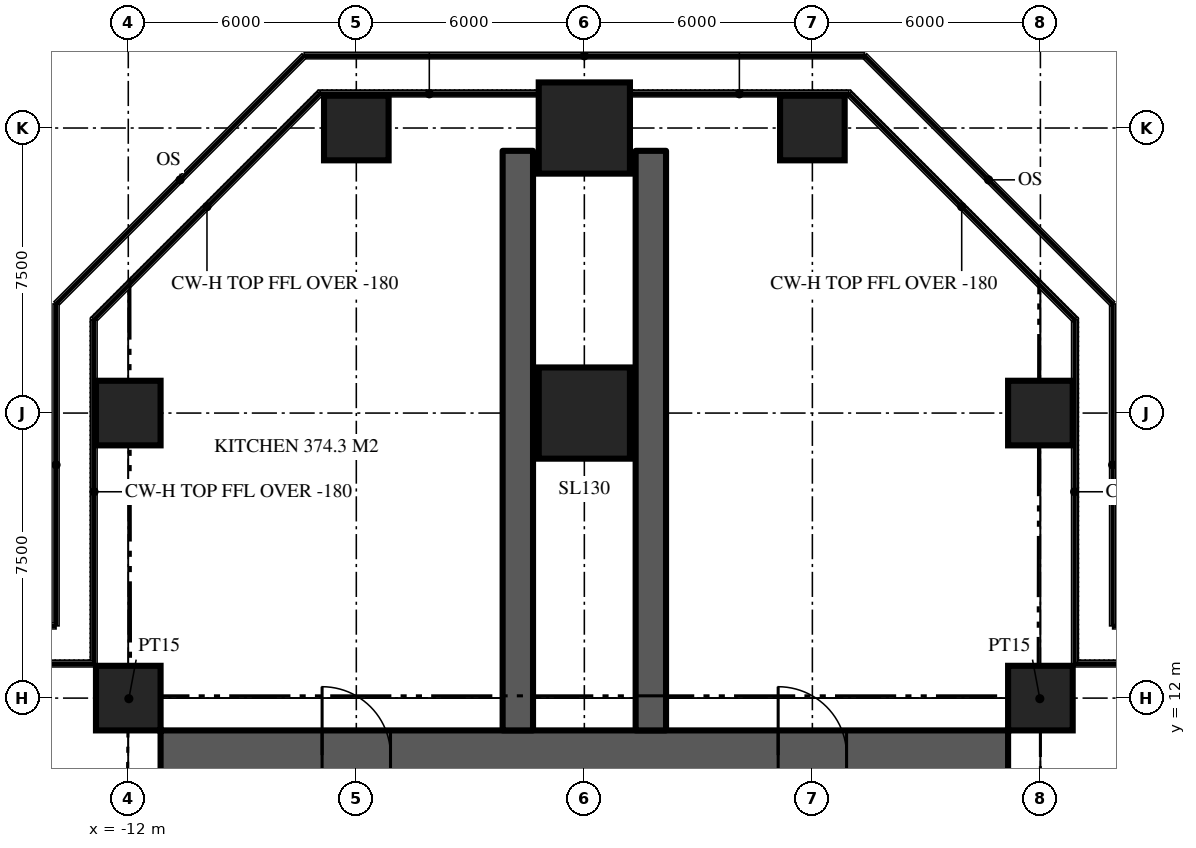
"""IFC4 building model, lengths in metres.
Left out: names, types, materials, properties, quantities, classifications, styles, units other than length and angle.
Written with IfcOpenShell. Run it as: python <this file> out.ifc"""

import sys

from ifc_helpers import new_model, si_unit, direction, frame, frame_2d, origin, origin_2d, place, context, subcontext, project, spatial, rectangle, extrude, element, fill, save


model = new_model("IFC4")
c1 = context("Model", 3, precision=1e-05, world=origin(), true_north=direction((0.0, 1.0)))
c2 = subcontext(c1, "Body", "Model", "MODEL_VIEW")
j1 = project(units=[si_unit("LENGTHUNIT", "METRE"), si_unit("PLANEANGLEUNIT", "RADIAN")], contexts=[c1])
p1 = place(None, origin())
s1 = spatial("IfcSite", under=j1, at=p1, CompositionType="ELEMENT")
p2 = place(p1, origin())
s2 = spatial("IfcBuilding", under=s1, at=p2, CompositionType="ELEMENT")
p3 = place(p2, frame((0.0, 0.0, 194.4)))
s3 = spatial("IfcBuildingStorey", under=s2, at=p3, CompositionType="ELEMENT", Elevation=194.4)
p4 = place(p3, frame((-11.15, 10.5, 0.0), z_axis=(0.0, 0.0, 1.0), x_axis=(1.0, 0.0, 0.0)))
e1 = element("IfcWall", 1, at=p4, inside=s3, PredefinedType="SHEAR", context=c2, shape_type="SweptSolid", body=[
    extrude(rectangle(XDim=22.3, YDim=1.3, at=frame_2d((11.15, 0.0))), origin(), (0.0, 0.0, 1.0), 4.5),
])
p5 = place(p4, frame((4.25, 0.0, 0.0)))
e2 = element("IfcOpeningElement", 2, at=p5, cuts=e1, PredefinedType="OPENING", context=c2, shape_type="SweptSolid", body=[
    extrude(rectangle(XDim=1.8, YDim=2.2, at=frame_2d((0.9, 1.1))), frame((0.0, 0.66, 0.0), z_axis=(0.0, -1.0, 0.0), x_axis=(1.0, 0.0, 0.0)), (0.0, 0.0, 1.0), 1.32),
])
p6 = place(p4, frame((16.25, 0.0, 0.0)))
e3 = element("IfcOpeningElement", 3, at=p6, cuts=e1, PredefinedType="OPENING", context=c2, shape_type="SweptSolid", body=[
    extrude(rectangle(XDim=1.8, YDim=2.2, at=frame_2d((0.9, 1.1))), frame((0.0, 0.66, 0.0), z_axis=(0.0, -1.0, 0.0), x_axis=(1.0, 0.0, 0.0)), (0.0, 0.0, 1.0), 1.32),
])
for number, where, z_axis, x_axis in (
    (4, (1.75, 11.15, 0.0), (0.0, 0.0, 1.0), (0.0, 1.0, 0.0)),
    (5, (-1.75, 11.15, 0.0), (0.0, 0.0, 1.0), (0.0, 1.0, 0.0)),
):
    element("IfcWall", number, at=place(p3, frame(where, z_axis=z_axis, x_axis=x_axis)), inside=s3, PredefinedType="SHEAR", context=c2, shape_type="SweptSolid", body=[
        extrude(rectangle(XDim=15.25, YDim=0.8, at=frame_2d((7.625, 0.0))), origin(), (0.0, 0.0, 1.0), 4.5),
    ])
for number, where, z_axis, x_axis in (
    (6, (-12.0, 12.0, 0.0), (0.0, 0.0, 1.0), (1.0, 0.0, 0.0)),
    (7, (12.0, 12.0, 0.0), (0.0, 0.0, 1.0), (1.0, 0.0, 0.0)),
    (8, (-12.0, 19.5, 0.0), (0.0, 0.0, 1.0), (1.0, 0.0, 0.0)),
):
    element("IfcColumn", number, at=place(p3, frame(where, z_axis=z_axis, x_axis=x_axis)), inside=s3, PredefinedType="COLUMN", context=c2, shape_type="SweptSolid", body=[
        extrude(rectangle(XDim=1.7, YDim=1.7, at=origin_2d()), origin(), (0.0, 0.0, 1.0), 4.5),
    ])
p7 = place(p3, frame((0.0, 19.5, 0.0), z_axis=(0.0, 0.0, 1.0), x_axis=(1.0, 0.0, 0.0)))
e9 = element("IfcColumn", 9, at=p7, inside=s3, PredefinedType="COLUMN", context=c2, shape_type="SweptSolid", body=[
    extrude(rectangle(XDim=2.4, YDim=2.4, at=origin_2d()), origin(), (0.0, 0.0, 1.0), 4.5),
])
for number, where, z_axis, x_axis in (
    (10, (12.0, 19.5, 0.0), (0.0, 0.0, 1.0), (1.0, 0.0, 0.0)),
    (11, (-6.0, 27.0, 0.0), (0.0, 0.0, 1.0), (1.0, 0.0, 0.0)),
):
    element("IfcColumn", number, at=place(p3, frame(where, z_axis=z_axis, x_axis=x_axis)), inside=s3, PredefinedType="COLUMN", context=c2, shape_type="SweptSolid", body=[
        extrude(rectangle(XDim=1.7, YDim=1.7, at=origin_2d()), origin(), (0.0, 0.0, 1.0), 4.5),
    ])
p8 = place(p3, frame((0.0, 27.0, 0.0), z_axis=(0.0, 0.0, 1.0), x_axis=(1.0, 0.0, 0.0)))
e12 = element("IfcColumn", 12, at=p8, inside=s3, PredefinedType="COLUMN", context=c2, shape_type="SweptSolid", body=[
    extrude(rectangle(XDim=2.4, YDim=2.4, at=origin_2d()), origin(), (0.0, 0.0, 1.0), 4.5),
])
p9 = place(p3, frame((6.0, 27.0, 0.0), z_axis=(0.0, 0.0, 1.0), x_axis=(1.0, 0.0, 0.0)))
e13 = element("IfcColumn", 13, at=p9, inside=s3, PredefinedType="COLUMN", context=c2, shape_type="SweptSolid", body=[
    extrude(rectangle(XDim=1.7, YDim=1.7, at=origin_2d()), origin(), (0.0, 0.0, 1.0), 4.5),
])
for number, where, z_axis, x_axis in (
    (14, (11.15, 11.15, 0.0), (0.0, 0.0, 1.0), (0.707, 0.707, 0.0)),
    (15, (-11.15, 11.15, 0.0), (0.0, 0.0, 1.0), (-0.707, 0.707, 0.0)),
):
    element("IfcWall", number, at=place(p3, frame(where, z_axis=z_axis, x_axis=x_axis)), inside=s3, PredefinedType="PARTITIONING", context=c2, shape_type="SweptSolid", body=[
        extrude(rectangle(XDim=2.362, YDim=0.15, at=frame_2d((1.181, 0.0))), origin(), (0.0, 0.0, 1.0), 4.32),
    ])
p10 = place(p5, origin())
e16 = element("IfcDoor", 16, at=p10, inside=s3, OperationType="DOUBLE_DOOR_DOUBLE_SWING", PredefinedType="DOOR", context=c2, shape_type="SweptSolid", body=[
    extrude(rectangle(XDim=1.8, YDim=2.2, at=frame_2d((0.9, 1.1))), frame((0.0, 0.025, 0.0), z_axis=(0.0, -1.0, 0.0), x_axis=(1.0, 0.0, 0.0)), (0.0, 0.0, 1.0), 0.05),
])
fill(e2, e16)
p11 = place(p6, origin())
e17 = element("IfcDoor", 17, at=p11, inside=s3, OperationType="DOUBLE_DOOR_DOUBLE_SWING", PredefinedType="DOOR", context=c2, shape_type="SweptSolid", body=[
    extrude(rectangle(XDim=1.8, YDim=2.2, at=frame_2d((0.9, 1.1))), frame((0.0, 0.025, 0.0), z_axis=(0.0, -1.0, 0.0), x_axis=(1.0, 0.0, 0.0)), (0.0, 0.0, 1.0), 0.05),
])
fill(e3, e17)
save(model, sys.argv[1])
